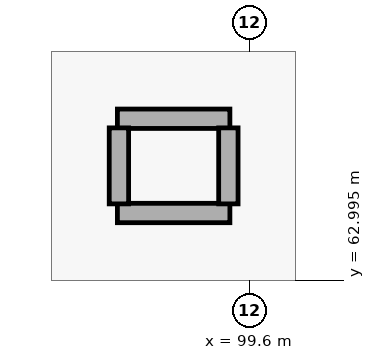
"""IFC4 building model, lengths in metres.
Left out: names, types, materials, properties, quantities, classifications, styles, units other than length and angle.
Written with IfcOpenShell. Run it as: python <this file> out.ifc"""

import sys

from ifc_helpers import new_model, si_unit, direction, frame, frame_2d, origin, place, context, subcontext, project, spatial, rectangle, extrude, element, save


model = new_model("IFC4")
c1 = context("Model", 3, precision=1e-05, world=origin(), true_north=direction((0.0, 1.0)))
c2 = subcontext(c1, "Body", "Model", "MODEL_VIEW")
j1 = project(units=[si_unit("LENGTHUNIT", "METRE"), si_unit("PLANEANGLEUNIT", "RADIAN")], contexts=[c1])
p1 = place(None, origin())
s1 = spatial("IfcSite", under=j1, at=p1, CompositionType="ELEMENT")
p2 = place(p1, origin())
s2 = spatial("IfcBuilding", under=s1, at=p2, CompositionType="ELEMENT")
p3 = place(p2, origin())
s3 = spatial("IfcBuildingStorey", under=s2, at=p3, CompositionType="ELEMENT", Elevation=0.0)
for number, where, z_axis, x_axis in (
    (1, (97.86, 65.12, 0.0), (0.0, 0.0, 1.0), (1.0, 0.0, 0.0)),
    (2, (97.86, 63.88, 0.0), (0.0, 0.0, 1.0), (1.0, 0.0, 0.0)),
):
    element("IfcWall", number, at=place(p3, frame(where, z_axis=z_axis, x_axis=x_axis)), inside=s3, PredefinedType="PARTITIONING", context=c2, shape_type="SweptSolid", body=[
        extrude(rectangle(XDim=1.48, YDim=0.255, at=frame_2d((0.74, 0.0))), origin(), (0.0, 0.0, 1.0), 4.59),
    ])
p4 = place(p3, frame((97.88, 64.0, 0.0), z_axis=(0.0, 0.0, 1.0), x_axis=(0.0, 1.0, 0.0)))
e3 = element("IfcWall", 3, at=p4, inside=s3, PredefinedType="PARTITIONING", context=c2, shape_type="SweptSolid", body=[
    extrude(rectangle(XDim=1.0, YDim=0.255, at=frame_2d((0.5, 0.0))), origin(), (0.0, 0.0, 1.0), 5.04),
])
p5 = place(p3, frame((99.32, 64.0, 0.0), z_axis=(0.0, 0.0, 1.0), x_axis=(0.0, 1.0, 0.0)))
e4 = element("IfcWall", 4, at=p5, inside=s3, PredefinedType="PARTITIONING", context=c2, shape_type="SweptSolid", body=[
    extrude(rectangle(XDim=1.0, YDim=0.255, at=frame_2d((0.5, 0.0))), origin(), (0.0, 0.0, 1.0), 4.59),
])
save(model, sys.argv[1])
